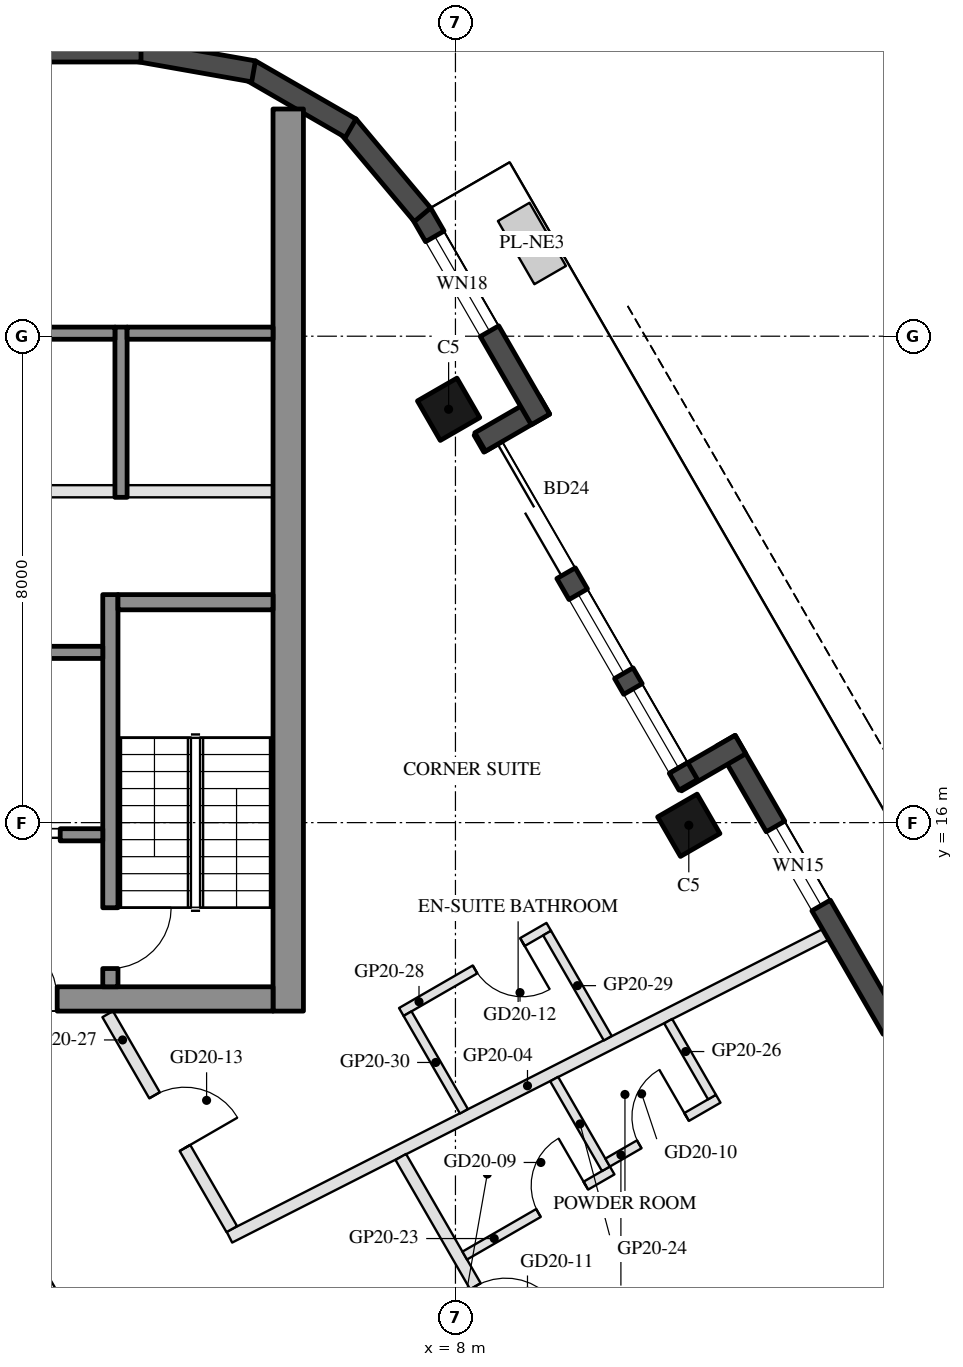
"""IFC4 building model, lengths in metres.
Left out: names, types, materials, properties, quantities, classifications, styles, units other than length and angle.
Written with IfcOpenShell. Run it as: python <this file> out.ifc"""

import sys

from ifc_helpers import new_model, si_unit, direction, frame, frame_2d, origin, origin_2d, place, context, subcontext, project, spatial, rectangle, hollow_rectangle, extrude, element, fill, save


model = new_model("IFC4")
c1 = context("Model", 3, precision=1e-05, world=origin(), true_north=direction((0.0, 1.0)))
c2 = subcontext(c1, "Body", "Model", "MODEL_VIEW")
j1 = project(units=[si_unit("LENGTHUNIT", "METRE"), si_unit("PLANEANGLEUNIT", "RADIAN")], contexts=[c1])
p1 = place(None, origin())
s1 = spatial("IfcSite", under=j1, at=p1, CompositionType="ELEMENT")
p2 = place(p1, origin())
s2 = spatial("IfcBuilding", under=s1, at=p2, CompositionType="ELEMENT")
p3 = place(p2, frame((0.0, 0.0, 209.5)))
s3 = spatial("IfcBuildingStorey", under=s2, at=p3, CompositionType="ELEMENT", Elevation=209.5)
for number, where, z_axis, x_axis in (
    (1, (11.838, 15.957, 0.0), (0.0, 0.0, 1.0), (-0.5, 0.866, 0.0)),
    (2, (7.888, 22.798, 0.0), (0.0, 0.0, 1.0), (-0.5, 0.866, 0.0)),
):
    element("IfcColumn", number, at=place(p3, frame(where, z_axis=z_axis, x_axis=x_axis)), inside=s3, PredefinedType="COLUMN", context=c2, shape_type="SweptSolid", body=[
        extrude(hollow_rectangle(XDim=0.75, YDim=0.75, WallThickness=0.035, at=origin_2d()), origin(), (0.0, 0.0, 1.0), 3.7),
    ])
p4 = place(p3, frame((17.299, 8.948, 0.0), z_axis=(0.0, 0.0, 1.0), x_axis=(-0.500010041276, 0.866019606374, 0.0)))
e3 = element("IfcWall", 3, at=p4, inside=s3, PredefinedType="SOLIDWALL", context=c2, shape_type="SweptSolid", body=[
    extrude(rectangle(XDim=9.7, YDim=0.35, at=frame_2d((4.85, 0.0))), origin(), (0.0, 0.0, 1.0), 3.55),
])
p5 = place(p4, frame((1.625, 0.0, 0.3)))
e4 = element("IfcOpeningElement", 4, at=p5, cuts=e3, PredefinedType="OPENING", context=c2, shape_type="SweptSolid", body=[
    extrude(rectangle(XDim=2.6, YDim=2.65, at=frame_2d((1.3, 1.325))), frame((0.0, 0.185, 0.0), z_axis=(0.0, -1.0, 0.0), x_axis=(1.0, 0.0, 0.0)), (0.0, 0.0, 1.0), 0.37),
])
p6 = place(p4, frame((6.57, 0.0, 0.3)))
e5 = element("IfcOpeningElement", 5, at=p6, cuts=e3, PredefinedType="OPENING", context=c2, shape_type="SweptSolid", body=[
    extrude(rectangle(XDim=1.5, YDim=2.65, at=frame_2d((0.75, 1.325))), frame((0.0, 0.185, 0.0), z_axis=(0.0, -1.0, 0.0), x_axis=(1.0, 0.0, 0.0)), (0.0, 0.0, 1.0), 0.37),
])
p7 = place(p3, frame((12.688, 17.284, 0.0), z_axis=(0.0, 0.0, 1.0), x_axis=(-0.865955602162, -0.500120880472, 0.0)))
e6 = element("IfcWall", 6, at=p7, inside=s3, PredefinedType="SOLIDWALL", context=c2, shape_type="SweptSolid", body=[
    extrude(rectangle(XDim=1.22, YDim=0.35, at=frame_2d((0.61, 0.0))), origin(), (0.0, 0.0, 1.0), 3.55),
])
p8 = place(p3, frame((11.829, 16.621, 0.0), z_axis=(0.0, 0.0, 1.0), x_axis=(-0.500003597184, 0.866023326939, 0.0)))
e7 = element("IfcWall", 7, at=p8, inside=s3, PredefinedType="SOLIDWALL", context=c2, shape_type="SweptSolid", body=[
    extrude(rectangle(XDim=6.74, YDim=0.35, at=frame_2d((3.37, 0.0))), origin(), (0.0, 0.0, 1.0), 3.55),
])
p9 = place(p8, frame((4.02, 0.0, 0.0)))
e8 = element("IfcOpeningElement", 8, at=p9, cuts=e7, PredefinedType="OPENING", context=c2, shape_type="SweptSolid", body=[
    extrude(rectangle(XDim=2.4, YDim=2.4, at=frame_2d((1.2, 1.2))), frame((0.0, 0.185, 0.0), z_axis=(0.0, -1.0, 0.0), x_axis=(1.0, 0.0, 0.0)), (0.0, 0.0, 1.0), 0.37),
])
p10 = place(p8, frame((0.32, 0.0, 0.3)))
e9 = element("IfcOpeningElement", 9, at=p10, cuts=e7, PredefinedType="OPENING", context=c2, shape_type="SweptSolid", body=[
    extrude(rectangle(XDim=1.5, YDim=2.65, at=frame_2d((0.75, 1.325))), frame((0.0, 0.185, 0.0), z_axis=(0.0, -1.0, 0.0), x_axis=(1.0, 0.0, 0.0)), (0.0, 0.0, 1.0), 0.37),
])
p11 = place(p8, frame((2.12, 0.0, 0.3)))
e10 = element("IfcOpeningElement", 10, at=p11, cuts=e7, PredefinedType="OPENING", context=c2, shape_type="SweptSolid", body=[
    extrude(rectangle(XDim=1.5, YDim=2.65, at=frame_2d((0.75, 1.325))), frame((0.0, 0.185, 0.0), z_axis=(0.0, -1.0, 0.0), x_axis=(1.0, 0.0, 0.0)), (0.0, 0.0, 1.0), 0.37),
])
p12 = place(p3, frame((8.406, 22.26, 0.0), z_axis=(0.0, 0.0, 1.0), x_axis=(0.865955602162, 0.500120880472, 0.0)))
e11 = element("IfcWall", 11, at=p12, inside=s3, PredefinedType="SOLIDWALL", context=c2, shape_type="SweptSolid", body=[
    extrude(rectangle(XDim=1.22, YDim=0.35, at=frame_2d((0.61, 0.0))), origin(), (0.0, 0.0, 1.0), 3.55),
])
p13 = place(p3, frame((9.398, 22.631, 0.0), z_axis=(0.0, 0.0, 1.0), x_axis=(-0.499954521343, 0.866051659307, 0.0)))
e12 = element("IfcWall", 12, at=p13, inside=s3, PredefinedType="SOLIDWALL", context=c2, shape_type="SweptSolid", body=[
    extrude(rectangle(XDim=3.916, YDim=0.35, at=frame_2d((1.958, 0.0))), origin(), (0.0, 0.0, 1.0), 3.55),
])
p14 = place(p13, frame((1.676, 0.0, 0.3)))
e13 = element("IfcOpeningElement", 13, at=p14, cuts=e12, PredefinedType="OPENING", context=c2, shape_type="SweptSolid", body=[
    extrude(rectangle(XDim=1.8, YDim=2.65, at=frame_2d((0.9, 1.325))), frame((0.0, 0.185, 0.0), z_axis=(0.0, -1.0, 0.0), x_axis=(1.0, 0.0, 0.0)), (0.0, 0.0, 1.0), 0.37),
])
p15 = place(p3, frame((7.458, 25.998, 0.0), z_axis=(0.0, 0.0, 1.0), x_axis=(-0.642808304945, 0.766027077259, 0.0)))
e14 = element("IfcWall", 14, at=p15, inside=s3, PredefinedType="SOLIDWALL", context=c2, shape_type="SweptSolid", body=[
    extrude(rectangle(XDim=1.91, YDim=0.35, at=frame_2d((0.955, 0.0))), origin(), (0.0, 0.0, 1.0), 3.55),
])
for number, where, z_axis, x_axis in (
    (15, (6.277, 27.422, 0.0), (0.0, 0.0, 1.0), (-0.866, 0.5, 0.0)),
    (16, (4.68, 28.356, 0.0), (0.0, 0.0, 1.0), (-0.985, 0.174, 0.0)),
):
    element("IfcWall", number, at=place(p3, frame(where, z_axis=z_axis, x_axis=x_axis)), inside=s3, PredefinedType="SOLIDWALL", context=c2, shape_type="SweptSolid", body=[
        extrude(rectangle(XDim=1.91, YDim=0.35, at=frame_2d((0.955, 0.0))), origin(), (0.0, 0.0, 1.0), 3.55),
    ])
p16 = place(p3, frame((2.829, 28.685, 0.0), z_axis=(0.0, 0.0, 1.0), x_axis=(-1.0, 0.0, 0.0)))
e17 = element("IfcWall", 17, at=p16, inside=s3, PredefinedType="SOLIDWALL", context=c2, shape_type="SweptSolid", body=[
    extrude(rectangle(XDim=5.658, YDim=0.35, at=frame_2d((2.829, 0.0))), origin(), (0.0, 0.0, 1.0), 3.55),
])
p17 = place(p3, frame((5.25, 12.9, 0.0), z_axis=(0.0, 0.0, 1.0), x_axis=(0.0, 1.0, 0.0)))
e18 = element("IfcWall", 18, at=p17, inside=s3, PredefinedType="SHEAR", context=c2, shape_type="SweptSolid", body=[
    extrude(rectangle(XDim=14.837, YDim=0.5, at=frame_2d((7.418, 0.0))), origin(), (0.0, 0.0, 1.0), 3.5),
])
p18 = place(p3, frame((5.0, 13.1, 0.0), z_axis=(0.0, 0.0, 1.0), x_axis=(-1.0, 0.0, 0.0)))
e19 = element("IfcWall", 19, at=p18, inside=s3, PredefinedType="SHEAR", context=c2, shape_type="SweptSolid", body=[
    extrude(rectangle(XDim=10.0, YDim=0.4, at=frame_2d((5.0, 0.0))), origin(), (0.0, 0.0, 1.0), 3.5),
])
p19 = place(p18, frame((3.55, 0.0, 0.0)))
e20 = element("IfcOpeningElement", 20, at=p19, cuts=e19, PredefinedType="OPENING", context=c2, shape_type="SweptSolid", body=[
    extrude(rectangle(XDim=1.1, YDim=2.1, at=frame_2d((0.55, 1.05))), frame((0.0, 0.21, 0.0), z_axis=(0.0, -1.0, 0.0), x_axis=(1.0, 0.0, 0.0)), (0.0, 0.0, 1.0), 0.42),
])
p20 = place(p18, frame((5.85, 0.0, 0.0)))
e21 = element("IfcOpeningElement", 21, at=p20, cuts=e19, PredefinedType="OPENING", context=c2, shape_type="SweptSolid", body=[
    extrude(rectangle(XDim=1.4, YDim=2.1, at=frame_2d((0.7, 1.05))), frame((0.0, 0.21, 0.0), z_axis=(0.0, -1.0, 0.0), x_axis=(1.0, 0.0, 0.0)), (0.0, 0.0, 1.0), 0.42),
])
p21 = place(p3, frame((2.325, 13.3, 0.0), z_axis=(0.0, 0.0, 1.0), x_axis=(0.0, 1.0, 0.0)))
e22 = element("IfcWall", 22, at=p21, inside=s3, PredefinedType="SHEAR", context=c2, shape_type="SweptSolid", body=[
    extrude(rectangle(XDim=6.45, YDim=0.25, at=frame_2d((3.225, 0.0))), origin(), (0.0, 0.0, 1.0), 3.5),
])
p22 = place(p21, frame((0.3, 0.0, 0.0)))
e23 = element("IfcOpeningElement", 23, at=p22, cuts=e22, PredefinedType="OPENING", context=c2, shape_type="SweptSolid", body=[
    extrude(rectangle(XDim=1.0, YDim=2.1, at=frame_2d((0.5, 1.05))), frame((0.0, 0.135, 0.0), z_axis=(0.0, -1.0, 0.0), x_axis=(1.0, 0.0, 0.0)), (0.0, 0.0, 1.0), 0.27),
])
p23 = place(p3, frame((5.0, 19.625, 0.0), z_axis=(0.0, 0.0, 1.0), x_axis=(-1.0, 0.0, 0.0)))
e24 = element("IfcWall", 24, at=p23, inside=s3, PredefinedType="SHEAR", context=c2, shape_type="SweptSolid", body=[
    extrude(rectangle(XDim=2.55, YDim=0.25, at=frame_2d((1.275, 0.0))), origin(), (0.0, 0.0, 1.0), 3.5),
])
p24 = place(p3, frame((2.2, 18.8, 0.0), z_axis=(0.0, 0.0, 1.0), x_axis=(-1.0, 0.0, 0.0)))
e25 = element("IfcWall", 25, at=p24, inside=s3, PredefinedType="SHEAR", context=c2, shape_type="SweptSolid", body=[
    extrude(rectangle(XDim=2.8, YDim=0.2, at=frame_2d((1.4, 0.0))), origin(), (0.0, 0.0, 1.0), 3.5),
])
p25 = place(p3, frame((2.2, 15.8, 0.0), z_axis=(0.0, 0.0, 1.0), x_axis=(-1.0, 0.0, 0.0)))
e26 = element("IfcWall", 26, at=p25, inside=s3, PredefinedType="SHEAR", context=c2, shape_type="SweptSolid", body=[
    extrude(rectangle(XDim=2.8, YDim=0.2, at=frame_2d((1.4, 0.0))), origin(), (0.0, 0.0, 1.0), 3.5),
])
p26 = place(p25, frame((0.7, 0.0, 0.0)))
e27 = element("IfcOpeningElement", 27, at=p26, cuts=e26, PredefinedType="OPENING", context=c2, shape_type="SweptSolid", body=[
    extrude(rectangle(XDim=1.2, YDim=2.1, at=frame_2d((0.6, 1.05))), frame((0.0, 0.11, 0.0), z_axis=(0.0, -1.0, 0.0), x_axis=(1.0, 0.0, 0.0)), (0.0, 0.0, 1.0), 0.22),
])
p27 = place(p3, frame((2.5, 21.35, 0.0), z_axis=(0.0, 0.0, 1.0), x_axis=(0.0, 1.0, 0.0)))
e28 = element("IfcWall", 28, at=p27, inside=s3, PredefinedType="SHEAR", context=c2, shape_type="SweptSolid", body=[
    extrude(rectangle(XDim=2.8, YDim=0.2, at=frame_2d((1.4, 0.0))), origin(), (0.0, 0.0, 1.0), 3.5),
])
p28 = place(p3, frame((5.0, 24.05, 0.0), z_axis=(0.0, 0.0, 1.0), x_axis=(-1.0, 0.0, 0.0)))
e29 = element("IfcWall", 29, at=p28, inside=s3, PredefinedType="SHEAR", context=c2, shape_type="SweptSolid", body=[
    extrude(rectangle(XDim=2.4, YDim=0.2, at=frame_2d((1.2, 0.0))), origin(), (0.0, 0.0, 1.0), 3.5),
])
p29 = place(p3, frame((2.4, 24.05, 0.0), z_axis=(0.0, 0.0, 1.0), x_axis=(-1.0, 0.0, 0.0)))
e30 = element("IfcWall", 30, at=p29, inside=s3, PredefinedType="SHEAR", context=c2, shape_type="SweptSolid", body=[
    extrude(rectangle(XDim=2.8, YDim=0.2, at=frame_2d((1.4, 0.0))), origin(), (0.0, 0.0, 1.0), 3.5),
])
p30 = place(p3, frame((5.0, 21.45, 0.0), z_axis=(0.0, 0.0, 1.0), x_axis=(-1.0, 0.0, 0.0)))
e31 = element("IfcWall", 31, at=p30, inside=s3, PredefinedType="PARTITIONING", context=c2, shape_type="SweptSolid", body=[
    extrude(rectangle(XDim=2.4, YDim=0.2, at=frame_2d((1.2, 0.0))), origin(), (0.0, 0.0, 1.0), 3.5),
])
p31 = place(p3, frame((2.4, 21.45, 0.0), z_axis=(0.0, 0.0, 1.0), x_axis=(-1.0, 0.0, 0.0)))
e32 = element("IfcWall", 32, at=p31, inside=s3, PredefinedType="PARTITIONING", context=c2, shape_type="SweptSolid", body=[
    extrude(rectangle(XDim=2.8, YDim=0.2, at=frame_2d((1.4, 0.0))), origin(), (0.0, 0.0, 1.0), 3.5),
])
p32 = place(p3, frame((14.087, 14.161, 0.0), z_axis=(0.0, 0.0, 1.0), x_axis=(-0.891639053189, -0.452746947895, 0.0)))
e33 = element("IfcWall", 33, at=p32, inside=s3, PredefinedType="PARTITIONING", context=c2, shape_type="SweptSolid", body=[
    extrude(rectangle(XDim=10.996, YDim=0.2, at=frame_2d((5.498, 0.0))), origin(), (0.0, 0.0, 1.0), 3.06),
])
p33 = place(p3, frame((7.101, 10.501, 0.0), z_axis=(0.0, 0.0, 1.0), x_axis=(0.500001329633, -0.866024636119, 0.0)))
e34 = element("IfcWall", 34, at=p33, inside=s3, PredefinedType="PARTITIONING", context=c2, shape_type="SweptSolid", body=[
    extrude(rectangle(XDim=11.544, YDim=0.2, at=frame_2d((5.772, 0.0))), origin(), (0.0, 0.0, 1.0), 2.95),
])
p34 = place(p33, frame((2.455, 0.0, 0.0)))
e35 = element("IfcOpeningElement", 35, at=p34, cuts=e34, PredefinedType="OPENING", context=c2, shape_type="SweptSolid", body=[
    extrude(rectangle(XDim=1.0, YDim=2.1, at=frame_2d((0.5, 1.05))), frame((0.0, 0.11, 0.0), z_axis=(0.0, -1.0, 0.0), x_axis=(1.0, 0.0, 0.0)), (0.0, 0.0, 1.0), 0.22),
])
p35 = place(p3, frame((8.153, 8.879, 0.0), z_axis=(0.0, 0.0, 1.0), x_axis=(0.866034573852, 0.49998411664, 0.0)))
e36 = element("IfcWall", 36, at=p35, inside=s3, PredefinedType="PARTITIONING", context=c2, shape_type="SweptSolid", body=[
    extrude(rectangle(XDim=2.8, YDim=0.15, at=frame_2d((1.4, 0.0))), origin(), (0.0, 0.0, 1.0), 3.55),
])
p36 = place(p35, frame((1.4, 0.0, 0.0)))
e37 = element("IfcOpeningElement", 37, at=p36, cuts=e36, PredefinedType="OPENING", context=c2, shape_type="SweptSolid", body=[
    extrude(rectangle(XDim=0.9, YDim=2.1, at=frame_2d((0.45, 1.05))), frame((0.0, 0.085, 0.0), z_axis=(0.0, -1.0, 0.0), x_axis=(1.0, 0.0, 0.0)), (0.0, 0.0, 1.0), 0.17),
])
p37 = place(p3, frame((10.475, 10.307, 0.0), z_axis=(0.0, 0.0, 1.0), x_axis=(-0.500069835465, 0.865985080505, 0.0)))
e38 = element("IfcWall", 38, at=p37, inside=s3, PredefinedType="PARTITIONING", context=c2, shape_type="SweptSolid", body=[
    extrude(rectangle(XDim=1.703, YDim=0.15, at=frame_2d((0.852, 0.0))), origin(), (0.0, 0.0, 1.0), 2.95),
])
p38 = place(p3, frame((10.503, 10.409, 0.0), z_axis=(0.0, 0.0, 1.0), x_axis=(0.866009402589, 0.500027713859, 0.0)))
e39 = element("IfcWall", 39, at=p38, inside=s3, PredefinedType="PARTITIONING", context=c2, shape_type="SweptSolid", body=[
    extrude(rectangle(XDim=2.1, YDim=0.15, at=frame_2d((1.05, 0.0))), origin(), (0.0, 0.0, 1.0), 3.55),
])
p39 = place(p38, frame((0.6, 0.0, 0.0)))
e40 = element("IfcOpeningElement", 40, at=p39, cuts=e39, PredefinedType="OPENING", context=c2, shape_type="SweptSolid", body=[
    extrude(rectangle(XDim=0.9, YDim=2.1, at=frame_2d((0.45, 1.05))), frame((0.0, 0.085, 0.0), z_axis=(0.0, -1.0, 0.0), x_axis=(1.0, 0.0, 0.0)), (0.0, 0.0, 1.0), 0.17),
])
p40 = place(p3, frame((12.219, 11.486, 0.0), z_axis=(0.0, 0.0, 1.0), x_axis=(-0.500074377092, 0.865982457891, 0.0)))
e41 = element("IfcWall", 41, at=p40, inside=s3, PredefinedType="PARTITIONING", context=c2, shape_type="SweptSolid", body=[
    extrude(rectangle(XDim=1.441, YDim=0.15, at=frame_2d((0.721, 0.0))), origin(), (0.0, 0.0, 1.0), 2.95),
])
p41 = place(p3, frame((2.281, 12.85, 0.0), z_axis=(0.0, 0.0, 1.0), x_axis=(0.500010586081, -0.866019291821, 0.0)))
e42 = element("IfcWall", 42, at=p41, inside=s3, PredefinedType="PARTITIONING", context=c2, shape_type="SweptSolid", body=[
    extrude(rectangle(XDim=4.083, YDim=0.2, at=frame_2d((2.042, 0.0))), origin(), (0.0, 0.0, 1.0), 2.95),
])
p42 = place(p41, frame((1.541, 0.0, 0.0)))
e43 = element("IfcOpeningElement", 43, at=p42, cuts=e42, PredefinedType="OPENING", context=c2, shape_type="SweptSolid", body=[
    extrude(rectangle(XDim=1.0, YDim=2.1, at=frame_2d((0.5, 1.05))), frame((0.0, 0.11, 0.0), z_axis=(0.0, -1.0, 0.0), x_axis=(1.0, 0.0, 0.0)), (0.0, 0.0, 1.0), 0.22),
])
p43 = place(p3, frame((9.534, 14.286, 0.0), z_axis=(0.0, 0.0, 1.0), x_axis=(-0.866034573852, -0.49998411664, 0.0)))
e44 = element("IfcWall", 44, at=p43, inside=s3, PredefinedType="PARTITIONING", context=c2, shape_type="SweptSolid", body=[
    extrude(rectangle(XDim=2.8, YDim=0.15, at=frame_2d((1.4, 0.0))), origin(), (0.0, 0.0, 1.0), 3.55),
])
p44 = place(p43, frame((0.5, 0.0, 0.0)))
e45 = element("IfcOpeningElement", 45, at=p44, cuts=e44, PredefinedType="OPENING", context=c2, shape_type="SweptSolid", body=[
    extrude(rectangle(XDim=0.9, YDim=2.1, at=frame_2d((0.45, 1.05))), frame((0.0, 0.085, 0.0), z_axis=(0.0, -1.0, 0.0), x_axis=(1.0, 0.0, 0.0)), (0.0, 0.0, 1.0), 0.17),
])
p45 = place(p3, frame((10.505, 12.454, 0.0), z_axis=(0.0, 0.0, 1.0), x_axis=(-0.499965889992, 0.866045096311, 0.0)))
e46 = element("IfcWall", 46, at=p45, inside=s3, PredefinedType="PARTITIONING", context=c2, shape_type="SweptSolid", body=[
    extrude(rectangle(XDim=1.997, YDim=0.15, at=frame_2d((0.999, 0.0))), origin(), (0.0, 0.0, 1.0), 3.55),
])
p46 = place(p3, frame((8.139, 11.253, 0.0), z_axis=(0.0, 0.0, 1.0), x_axis=(-0.4999770169, 0.866038672677, 0.0)))
e47 = element("IfcWall", 47, at=p46, inside=s3, PredefinedType="PARTITIONING", context=c2, shape_type="SweptSolid", body=[
    extrude(rectangle(XDim=1.854, YDim=0.15, at=frame_2d((0.927, 0.0))), origin(), (0.0, 0.0, 1.0), 3.55),
])
p47 = place(p6, origin())
e48 = element("IfcWindow", 48, at=p47, inside=s3, PartitioningType="SINGLE_PANEL", PredefinedType="WINDOW", context=c2, shape_type="SweptSolid", body=[
    extrude(rectangle(XDim=1.5, YDim=2.65, at=frame_2d((0.75, 1.325))), frame((0.0, 0.03, 0.0), z_axis=(0.0, -1.0, 0.0), x_axis=(1.0, 0.0, 0.0)), (0.0, 0.0, 1.0), 0.06),
])
fill(e5, e48)
p48 = place(p9, frame((2.4, 0.0, 0.0), z_axis=(0.0, 0.0, 1.0), x_axis=(-1.0, 0.0, 0.0)))
e49 = element("IfcDoor", 49, at=p48, inside=s3, OperationType="SLIDING_TO_LEFT", PredefinedType="DOOR", context=c2, shape_type="SweptSolid", body=[
    extrude(rectangle(XDim=2.4, YDim=2.4, at=frame_2d((1.2, 1.2))), frame((0.0, 0.025, 0.0), z_axis=(0.0, -1.0, 0.0), x_axis=(1.0, 0.0, 0.0)), (0.0, 0.0, 1.0), 0.05),
])
fill(e8, e49)
p49 = place(p10, origin())
e50 = element("IfcWindow", 50, at=p49, inside=s3, PartitioningType="SINGLE_PANEL", PredefinedType="WINDOW", context=c2, shape_type="SweptSolid", body=[
    extrude(rectangle(XDim=1.5, YDim=2.65, at=frame_2d((0.75, 1.325))), frame((0.0, 0.03, 0.0), z_axis=(0.0, -1.0, 0.0), x_axis=(1.0, 0.0, 0.0)), (0.0, 0.0, 1.0), 0.06),
])
fill(e9, e50)
p50 = place(p11, origin())
e51 = element("IfcWindow", 51, at=p50, inside=s3, PartitioningType="SINGLE_PANEL", PredefinedType="WINDOW", context=c2, shape_type="SweptSolid", body=[
    extrude(rectangle(XDim=1.5, YDim=2.65, at=frame_2d((0.75, 1.325))), frame((0.0, 0.03, 0.0), z_axis=(0.0, -1.0, 0.0), x_axis=(1.0, 0.0, 0.0)), (0.0, 0.0, 1.0), 0.06),
])
fill(e10, e51)
p51 = place(p14, origin())
e52 = element("IfcWindow", 52, at=p51, inside=s3, PartitioningType="SINGLE_PANEL", PredefinedType="WINDOW", context=c2, shape_type="SweptSolid", body=[
    extrude(rectangle(XDim=1.8, YDim=2.65, at=frame_2d((0.9, 1.325))), frame((0.0, 0.03, 0.0), z_axis=(0.0, -1.0, 0.0), x_axis=(1.0, 0.0, 0.0)), (0.0, 0.0, 1.0), 0.06),
])
fill(e13, e52)
p52 = place(p26, origin())
e53 = element("IfcDoor", 53, at=p52, inside=s3, OperationType="DOUBLE_DOOR_SLIDING", PredefinedType="DOOR", context=c2, shape_type="SweptSolid", body=[
    extrude(rectangle(XDim=1.2, YDim=2.1, at=frame_2d((0.6, 1.05))), frame((0.0, 0.025, 0.0), z_axis=(0.0, -1.0, 0.0), x_axis=(1.0, 0.0, 0.0)), (0.0, 0.0, 1.0), 0.05),
])
fill(e27, e53)
p53 = place(p19, frame((1.1, 0.0, 0.0), z_axis=(0.0, 0.0, 1.0), x_axis=(-1.0, 0.0, 0.0)))
e54 = element("IfcDoor", 54, at=p53, inside=s3, OperationType="SINGLE_SWING_LEFT", PredefinedType="DOOR", context=c2, shape_type="SweptSolid", body=[
    extrude(rectangle(XDim=1.1, YDim=2.1, at=frame_2d((0.55, 1.05))), frame((0.0, 0.025, 0.0), z_axis=(0.0, -1.0, 0.0), x_axis=(1.0, 0.0, 0.0)), (0.0, 0.0, 1.0), 0.05),
])
fill(e20, e54)
p54 = place(p22, frame((1.0, 0.0, 0.0), z_axis=(0.0, 0.0, 1.0), x_axis=(-1.0, 0.0, 0.0)))
e55 = element("IfcDoor", 55, at=p54, inside=s3, OperationType="SINGLE_SWING_LEFT", PredefinedType="DOOR", context=c2, shape_type="SweptSolid", body=[
    extrude(rectangle(XDim=1.0, YDim=2.1, at=frame_2d((0.5, 1.05))), frame((0.0, 0.025, 0.0), z_axis=(0.0, -1.0, 0.0), x_axis=(1.0, 0.0, 0.0)), (0.0, 0.0, 1.0), 0.05),
])
fill(e23, e55)
p55 = place(p36, origin())
e56 = element("IfcDoor", 56, at=p55, inside=s3, OperationType="SINGLE_SWING_RIGHT", PredefinedType="DOOR", context=c2, shape_type="SweptSolid", body=[
    extrude(rectangle(XDim=0.9, YDim=2.1, at=frame_2d((0.45, 1.05))), frame((0.0, 0.025, 0.0), z_axis=(0.0, -1.0, 0.0), x_axis=(1.0, 0.0, 0.0)), (0.0, 0.0, 1.0), 0.05),
])
fill(e37, e56)
p56 = place(p39, origin())
e57 = element("IfcDoor", 57, at=p56, inside=s3, OperationType="SINGLE_SWING_RIGHT", PredefinedType="DOOR", context=c2, shape_type="SweptSolid", body=[
    extrude(rectangle(XDim=0.9, YDim=2.1, at=frame_2d((0.45, 1.05))), frame((0.0, 0.025, 0.0), z_axis=(0.0, -1.0, 0.0), x_axis=(1.0, 0.0, 0.0)), (0.0, 0.0, 1.0), 0.05),
])
fill(e40, e57)
p57 = place(p34, origin())
e58 = element("IfcDoor", 58, at=p57, inside=s3, OperationType="SINGLE_SWING_RIGHT", PredefinedType="DOOR", context=c2, shape_type="SweptSolid", body=[
    extrude(rectangle(XDim=1.0, YDim=2.1, at=frame_2d((0.5, 1.05))), frame((0.0, 0.025, 0.0), z_axis=(0.0, -1.0, 0.0), x_axis=(1.0, 0.0, 0.0)), (0.0, 0.0, 1.0), 0.05),
])
fill(e35, e58)
p58 = place(p44, origin())
e59 = element("IfcDoor", 59, at=p58, inside=s3, OperationType="SINGLE_SWING_LEFT", PredefinedType="DOOR", context=c2, shape_type="SweptSolid", body=[
    extrude(rectangle(XDim=0.9, YDim=2.1, at=frame_2d((0.45, 1.05))), frame((0.0, 0.025, 0.0), z_axis=(0.0, -1.0, 0.0), x_axis=(1.0, 0.0, 0.0)), (0.0, 0.0, 1.0), 0.05),
])
fill(e45, e59)
p59 = place(p42, origin())
e60 = element("IfcDoor", 60, at=p59, inside=s3, OperationType="SINGLE_SWING_RIGHT", PredefinedType="DOOR", context=c2, shape_type="SweptSolid", body=[
    extrude(rectangle(XDim=1.0, YDim=2.1, at=frame_2d((0.5, 1.05))), frame((0.0, 0.025, 0.0), z_axis=(0.0, -1.0, 0.0), x_axis=(1.0, 0.0, 0.0)), (0.0, 0.0, 1.0), 0.05),
])
fill(e43, e60)
save(model, sys.argv[1])
